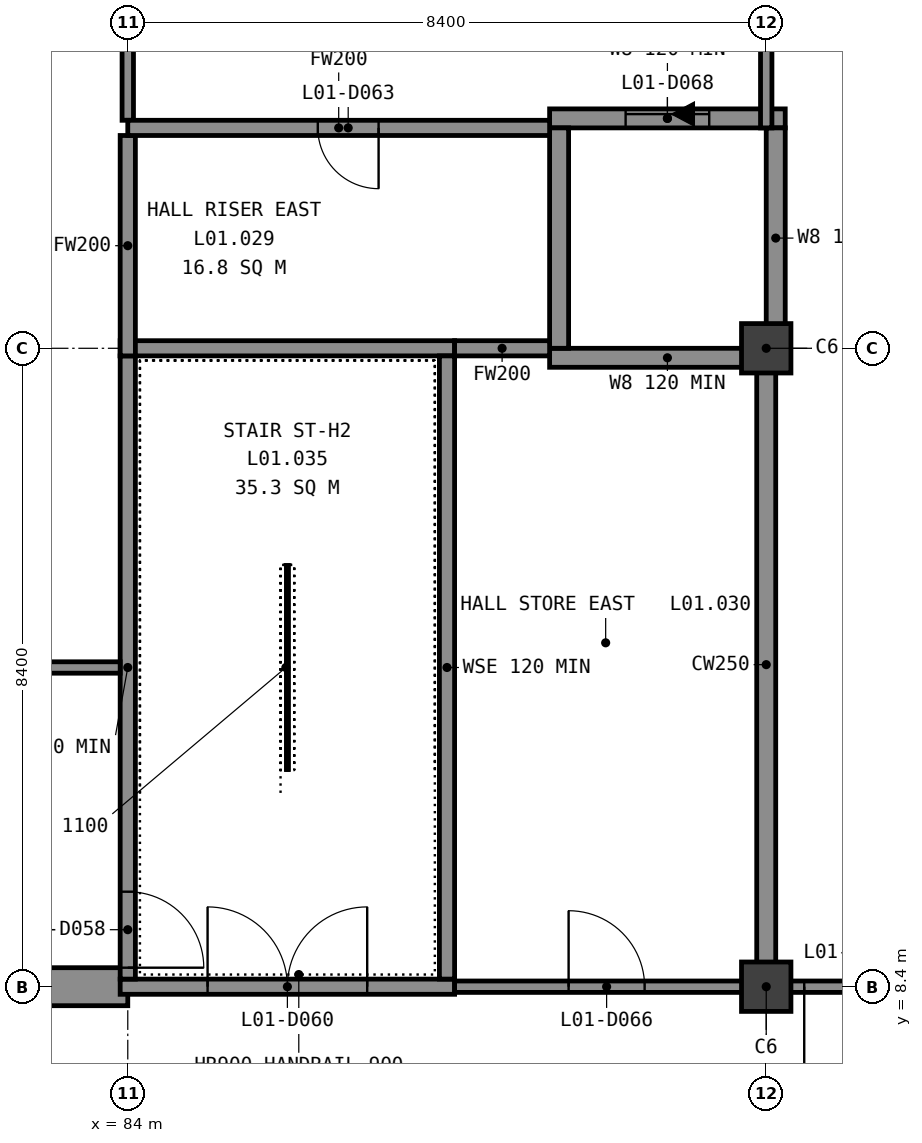
"""IFC4 building model, lengths in metres.
Left out: names, types, materials, properties, quantities, classifications, styles, units other than length and angle.
Written with IfcOpenShell. Run it as: python <this file> out.ifc"""

import sys

from ifc_helpers import new_model, si_unit, direction, frame, frame_2d, origin, origin_2d, place, context, subcontext, project, spatial, rectangle, extrude, element, fill, save


model = new_model("IFC4")
c1 = context("Model", 3, precision=1e-05, world=origin(), true_north=direction((0.0, 1.0)))
c2 = subcontext(c1, "Body", "Model", "MODEL_VIEW")
j1 = project(units=[si_unit("LENGTHUNIT", "METRE"), si_unit("PLANEANGLEUNIT", "RADIAN")], contexts=[c1])
p1 = place(None, origin())
s1 = spatial("IfcSite", under=j1, at=p1, CompositionType="ELEMENT")
p2 = place(p1, origin())
s2 = spatial("IfcBuilding", under=s1, at=p2, CompositionType="ELEMENT")
p3 = place(p2, frame((0.0, 0.0, 5.4)))
s3 = spatial("IfcBuildingStorey", under=s2, at=p3, CompositionType="ELEMENT", Elevation=5.4)
for number, where, z_axis, x_axis in (
    (1, (92.4, 8.4, -0.3), (0.0, 0.0, 1.0), (1.0, 0.0, 0.0)),
    (2, (92.4, 16.8, -0.3), (0.0, 0.0, 1.0), (1.0, 0.0, 0.0)),
):
    element("IfcColumn", number, at=place(p3, frame(where, z_axis=z_axis, x_axis=x_axis)), inside=s3, PredefinedType="COLUMN", context=c2, shape_type="SweptSolid", body=[
        extrude(rectangle(XDim=0.65, YDim=0.65, at=origin_2d()), origin(), (0.0, 0.0, 1.0), 4.55),
    ])
p4 = place(p3, frame((89.55, 16.675, -0.3), z_axis=(0.0, 0.0, 1.0), x_axis=(1.0, 0.0, 0.0)))
e3 = element("IfcWall", 3, at=p4, inside=s3, PredefinedType="SHEAR", context=c2, shape_type="SweptSolid", body=[
    extrude(rectangle(XDim=3.1, YDim=0.25, at=frame_2d((1.55, 0.0))), origin(), (0.0, 0.0, 1.0), 4.55),
])
p5 = place(p3, frame((89.55, 19.825, -0.3), z_axis=(0.0, 0.0, 1.0), x_axis=(1.0, 0.0, 0.0)))
e4 = element("IfcWall", 4, at=p5, inside=s3, PredefinedType="SHEAR", context=c2, shape_type="SweptSolid", body=[
    extrude(rectangle(XDim=3.1, YDim=0.25, at=frame_2d((1.55, 0.0))), origin(), (0.0, 0.0, 1.0), 4.55),
])
p6 = place(p5, frame((1.0, 0.0, 0.3)))
e5 = element("IfcOpeningElement", 5, at=p6, cuts=e4, PredefinedType="OPENING", context=c2, shape_type="SweptSolid", body=[
    extrude(rectangle(XDim=1.1, YDim=2.1, at=frame_2d((0.55, 1.05))), frame((0.0, 0.135, 0.0), z_axis=(0.0, -1.0, 0.0), x_axis=(1.0, 0.0, 0.0)), (0.0, 0.0, 1.0), 0.27),
])
for number, where, z_axis, x_axis in (
    (6, (89.675, 16.8, -0.3), (0.0, 0.0, 1.0), (0.0, 1.0, 0.0)),
    (7, (92.525, 16.8, -0.3), (0.0, 0.0, 1.0), (0.0, 1.0, 0.0)),
):
    element("IfcWall", number, at=place(p3, frame(where, z_axis=z_axis, x_axis=x_axis)), inside=s3, PredefinedType="SHEAR", context=c2, shape_type="SweptSolid", body=[
        extrude(rectangle(XDim=2.9, YDim=0.25, at=frame_2d((1.45, 0.0))), origin(), (0.0, 0.0, 1.0), 4.55),
    ])
p7 = place(p3, frame((42.0, 8.4, -0.3), z_axis=(0.0, 0.0, 1.0), x_axis=(1.0, 0.0, 0.0)))
e8 = element("IfcWall", 8, at=p7, inside=s3, PredefinedType="SHEAR", context=c2, shape_type="SweptSolid", body=[
    extrude(rectangle(XDim=42.0, YDim=0.5, at=frame_2d((21.0, 0.0))), origin(), (0.0, 0.0, 1.0), 4.55),
])
p8 = place(p7, frame((20.6, 0.0, 0.3)))
e9 = element("IfcOpeningElement", 9, at=p8, cuts=e8, PredefinedType="OPENING", context=c2, shape_type="SweptSolid", body=[
    extrude(rectangle(XDim=1.0, YDim=2.1, at=frame_2d((0.5, 1.05))), frame((0.0, 0.26, 0.0), z_axis=(0.0, -1.0, 0.0), x_axis=(1.0, 0.0, 0.0)), (0.0, 0.0, 1.0), 0.52),
])
p9 = place(p3, frame((83.9, 8.4, -0.3), z_axis=(0.0, 0.0, 1.0), x_axis=(1.0, 0.0, 0.0)))
e10 = element("IfcWall", 10, at=p9, inside=s3, PredefinedType="SHEAR", context=c2, shape_type="SweptSolid", body=[
    extrude(rectangle(XDim=4.4, YDim=0.2, at=frame_2d((2.2, 0.0))), origin(), (0.0, 0.0, 1.0), 4.5),
])
p10 = place(p9, frame((1.15, 0.0, 0.3)))
e11 = element("IfcOpeningElement", 11, at=p10, cuts=e10, PredefinedType="OPENING", context=c2, shape_type="SweptSolid", body=[
    extrude(rectangle(XDim=2.1, YDim=2.1, at=frame_2d((1.05, 1.05))), frame((0.0, 0.11, 0.0), z_axis=(0.0, -1.0, 0.0), x_axis=(1.0, 0.0, 0.0)), (0.0, 0.0, 1.0), 0.22),
])
p11 = place(p3, frame((83.9, 16.8, -0.3), z_axis=(0.0, 0.0, 1.0), x_axis=(1.0, 0.0, 0.0)))
e12 = element("IfcWall", 12, at=p11, inside=s3, PredefinedType="SHEAR", context=c2, shape_type="SweptSolid", body=[
    extrude(rectangle(XDim=4.4, YDim=0.2, at=frame_2d((2.2, 0.0))), origin(), (0.0, 0.0, 1.0), 4.5),
])
p12 = place(p3, frame((84.0, 8.5, -0.3), z_axis=(0.0, 0.0, 1.0), x_axis=(0.0, 1.0, 0.0)))
e13 = element("IfcWall", 13, at=p12, inside=s3, PredefinedType="SHEAR", context=c2, shape_type="SweptSolid", body=[
    extrude(rectangle(XDim=8.2, YDim=0.2, at=frame_2d((4.1, 0.0))), origin(), (0.0, 0.0, 1.0), 4.5),
])
p13 = place(p12, frame((0.15, 0.0, 0.3)))
e14 = element("IfcOpeningElement", 14, at=p13, cuts=e13, PredefinedType="OPENING", context=c2, shape_type="SweptSolid", body=[
    extrude(rectangle(XDim=1.0, YDim=2.1, at=frame_2d((0.5, 1.05))), frame((0.0, 0.11, 0.0), z_axis=(0.0, -1.0, 0.0), x_axis=(1.0, 0.0, 0.0)), (0.0, 0.0, 1.0), 0.22),
])
p14 = place(p3, frame((88.2, 8.5, -0.3), z_axis=(0.0, 0.0, 1.0), x_axis=(0.0, 1.0, 0.0)))
e15 = element("IfcWall", 15, at=p14, inside=s3, PredefinedType="SHEAR", context=c2, shape_type="SweptSolid", body=[
    extrude(rectangle(XDim=8.2, YDim=0.2, at=frame_2d((4.1, 0.0))), origin(), (0.0, 0.0, 1.0), 4.5),
])
p15 = place(p3, frame((41.875, 12.6, -0.3), z_axis=(0.0, 0.0, 1.0), x_axis=(1.0, 0.0, 0.0)))
e16 = element("IfcWall", 16, at=p15, inside=s3, PredefinedType="PARTITIONING", context=c2, shape_type="SweptSolid", body=[
    extrude(rectangle(XDim=42.025, YDim=0.15, at=frame_2d((21.012, 0.0))), origin(), (0.0, 0.0, 1.0), 4.5),
])
p16 = place(p3, frame((84.0, 16.7, -0.3), z_axis=(0.0, 0.0, 1.0), x_axis=(0.0, 1.0, 0.0)))
e17 = element("IfcWall", 17, at=p16, inside=s3, PredefinedType="SOLIDWALL", context=c2, shape_type="SweptSolid", body=[
    extrude(rectangle(XDim=2.9, YDim=0.2, at=frame_2d((1.45, 0.0))), origin(), (0.0, 0.0, 1.0), 4.5),
])
p17 = place(p3, frame((84.0, 19.8, -0.3), z_axis=(0.0, 0.0, 1.0), x_axis=(0.0, 1.0, 0.0)))
e18 = element("IfcWall", 18, at=p17, inside=s3, PredefinedType="PARTITIONING", context=c2, shape_type="SweptSolid", body=[
    extrude(rectangle(XDim=5.805, YDim=0.15, at=frame_2d((2.902, 0.0))), origin(), (0.0, 0.0, 1.0), 4.5),
])
p18 = place(p3, frame((88.3, 8.4, 0.0), z_axis=(0.0, 0.0, 1.0), x_axis=(1.0, 0.0, 0.0)))
e19 = element("IfcWall", 19, at=p18, inside=s3, PredefinedType="PARTITIONING", context=c2, shape_type="SweptSolid", body=[
    extrude(rectangle(XDim=4.405, YDim=0.15, at=frame_2d((2.203, 0.0))), origin(), (0.0, 0.0, 1.0), 4.2),
])
p19 = place(p18, frame((1.5, 0.0, 0.0)))
e20 = element("IfcOpeningElement", 20, at=p19, cuts=e19, PredefinedType="OPENING", context=c2, shape_type="SweptSolid", body=[
    extrude(rectangle(XDim=1.0, YDim=2.1, at=frame_2d((0.5, 1.05))), frame((0.0, 0.085, 0.0), z_axis=(0.0, -1.0, 0.0), x_axis=(1.0, 0.0, 0.0)), (0.0, 0.0, 1.0), 0.17),
])
p20 = place(p3, frame((92.705, 8.4, 0.0), z_axis=(0.0, 0.0, 1.0), x_axis=(1.0, 0.0, 0.0)))
e21 = element("IfcWall", 21, at=p20, inside=s3, PredefinedType="PARTITIONING", context=c2, shape_type="SweptSolid", body=[
    extrude(rectangle(XDim=75.295, YDim=0.15, at=frame_2d((37.647, 0.0))), origin(), (0.0, 0.0, 1.0), 3.5),
])
p21 = place(p20, frame((0.195, 0.0, 0.0)))
e22 = element("IfcOpeningElement", 22, at=p21, cuts=e21, PredefinedType="OPENING", context=c2, shape_type="SweptSolid", body=[
    extrude(rectangle(XDim=1.2, YDim=2.1, at=frame_2d((0.6, 1.05))), frame((0.0, 0.085, 0.0), z_axis=(0.0, -1.0, 0.0), x_axis=(1.0, 0.0, 0.0)), (0.0, 0.0, 1.0), 0.17),
])
p22 = place(p20, frame((23.195, 0.0, 0.0)))
e23 = element("IfcOpeningElement", 23, at=p22, cuts=e21, PredefinedType="OPENING", context=c2, shape_type="SweptSolid", body=[
    extrude(rectangle(XDim=1.2, YDim=2.1, at=frame_2d((0.6, 1.05))), frame((0.0, 0.085, 0.0), z_axis=(0.0, -1.0, 0.0), x_axis=(1.0, 0.0, 0.0)), (0.0, 0.0, 1.0), 0.17),
])
p23 = place(p20, frame((25.395, 0.0, 0.0)))
e24 = element("IfcOpeningElement", 24, at=p23, cuts=e21, PredefinedType="OPENING", context=c2, shape_type="SweptSolid", body=[
    extrude(rectangle(XDim=1.2, YDim=2.1, at=frame_2d((0.6, 1.05))), frame((0.0, 0.085, 0.0), z_axis=(0.0, -1.0, 0.0), x_axis=(1.0, 0.0, 0.0)), (0.0, 0.0, 1.0), 0.17),
])
p24 = place(p20, frame((39.995, 0.0, 0.0)))
e25 = element("IfcOpeningElement", 25, at=p24, cuts=e21, PredefinedType="OPENING", context=c2, shape_type="SweptSolid", body=[
    extrude(rectangle(XDim=1.2, YDim=2.1, at=frame_2d((0.6, 1.05))), frame((0.0, 0.085, 0.0), z_axis=(0.0, -1.0, 0.0), x_axis=(1.0, 0.0, 0.0)), (0.0, 0.0, 1.0), 0.17),
])
p25 = place(p20, frame((42.195, 0.0, 0.0)))
e26 = element("IfcOpeningElement", 26, at=p25, cuts=e21, PredefinedType="OPENING", context=c2, shape_type="SweptSolid", body=[
    extrude(rectangle(XDim=1.2, YDim=2.1, at=frame_2d((0.6, 1.05))), frame((0.0, 0.085, 0.0), z_axis=(0.0, -1.0, 0.0), x_axis=(1.0, 0.0, 0.0)), (0.0, 0.0, 1.0), 0.17),
])
p26 = place(p20, frame((56.795, 0.0, 0.0)))
e27 = element("IfcOpeningElement", 27, at=p26, cuts=e21, PredefinedType="OPENING", context=c2, shape_type="SweptSolid", body=[
    extrude(rectangle(XDim=1.2, YDim=2.1, at=frame_2d((0.6, 1.05))), frame((0.0, 0.085, 0.0), z_axis=(0.0, -1.0, 0.0), x_axis=(1.0, 0.0, 0.0)), (0.0, 0.0, 1.0), 0.17),
])
p27 = place(p20, frame((67.395, 0.0, 0.0)))
e28 = element("IfcOpeningElement", 28, at=p27, cuts=e21, PredefinedType="OPENING", context=c2, shape_type="SweptSolid", body=[
    extrude(rectangle(XDim=1.2, YDim=2.1, at=frame_2d((0.6, 1.05))), frame((0.0, 0.085, 0.0), z_axis=(0.0, -1.0, 0.0), x_axis=(1.0, 0.0, 0.0)), (0.0, 0.0, 1.0), 0.17),
])
p28 = place(p3, frame((88.3, 16.8, 0.0), z_axis=(0.0, 0.0, 1.0), x_axis=(1.0, 0.0, 0.0)))
e29 = element("IfcWall", 29, at=p28, inside=s3, PredefinedType="SOLIDWALL", context=c2, shape_type="SweptSolid", body=[
    extrude(rectangle(XDim=1.25, YDim=0.2, at=frame_2d((0.625, 0.0))), origin(), (0.0, 0.0, 1.0), 4.2),
])
p29 = place(p3, frame((84.0, 19.7, 0.0), z_axis=(0.0, 0.0, 1.0), x_axis=(1.0, 0.0, 0.0)))
e30 = element("IfcWall", 30, at=p29, inside=s3, PredefinedType="SOLIDWALL", context=c2, shape_type="SweptSolid", body=[
    extrude(rectangle(XDim=5.55, YDim=0.2, at=frame_2d((2.775, 0.0))), origin(), (0.0, 0.0, 1.0), 4.2),
])
p30 = place(p29, frame((2.5, 0.0, 0.0)))
e31 = element("IfcOpeningElement", 31, at=p30, cuts=e30, PredefinedType="OPENING", context=c2, shape_type="SweptSolid", body=[
    extrude(rectangle(XDim=0.8, YDim=2.1, at=frame_2d((0.4, 1.05))), frame((0.0, 0.11, 0.0), z_axis=(0.0, -1.0, 0.0), x_axis=(1.0, 0.0, 0.0)), (0.0, 0.0, 1.0), 0.22),
])
p31 = place(p3, frame((92.4, 8.475, 0.0), z_axis=(0.0, 0.0, 1.0), x_axis=(0.0, 1.0, 0.0)))
e32 = element("IfcWall", 32, at=p31, inside=s3, PredefinedType="SOLIDWALL", context=c2, shape_type="SweptSolid", body=[
    extrude(rectangle(XDim=8.325, YDim=0.25, at=frame_2d((4.163, 0.0))), origin(), (0.0, 0.0, 1.0), 3.5),
])
p32 = place(p3, frame((92.4, 19.7, 0.0), z_axis=(0.0, 0.0, 1.0), x_axis=(0.0, 1.0, 0.0)))
e33 = element("IfcWall", 33, at=p32, inside=s3, PredefinedType="PARTITIONING", context=c2, shape_type="SweptSolid", body=[
    extrude(rectangle(XDim=13.595, YDim=0.15, at=frame_2d((6.797, 0.0))), origin(), (0.0, 0.0, 1.0), 3.5),
])
p33 = place(p32, frame((6.0, 0.0, 0.0)))
e34 = element("IfcOpeningElement", 34, at=p33, cuts=e33, PredefinedType="OPENING", context=c2, shape_type="SweptSolid", body=[
    extrude(rectangle(XDim=2.1, YDim=2.25, at=frame_2d((1.05, 1.125))), frame((0.0, 0.085, 0.0), z_axis=(0.0, -1.0, 0.0), x_axis=(1.0, 0.0, 0.0)), (0.0, 0.0, 1.0), 0.17),
])
p34 = place(p32, frame((11.3, 0.0, 0.0)))
e35 = element("IfcOpeningElement", 35, at=p34, cuts=e33, PredefinedType="OPENING", context=c2, shape_type="SweptSolid", body=[
    extrude(rectangle(XDim=2.1, YDim=2.25, at=frame_2d((1.05, 1.125))), frame((0.0, 0.085, 0.0), z_axis=(0.0, -1.0, 0.0), x_axis=(1.0, 0.0, 0.0)), (0.0, 0.0, 1.0), 0.17),
])
p35 = place(p6, origin())
e36 = element("IfcDoor", 36, at=p35, inside=s3, OperationType="SLIDING_TO_LEFT", PredefinedType="DOOR", context=c2, shape_type="SweptSolid", body=[
    extrude(rectangle(XDim=1.1, YDim=2.1, at=frame_2d((0.55, 1.05))), frame((0.0, 0.025, 0.0), z_axis=(0.0, -1.0, 0.0), x_axis=(1.0, 0.0, 0.0)), (0.0, 0.0, 1.0), 0.05),
])
fill(e5, e36)
p36 = place(p10, origin())
e37 = element("IfcDoor", 37, at=p36, inside=s3, OperationType="DOUBLE_DOOR_SINGLE_SWING", PredefinedType="DOOR", context=c2, shape_type="SweptSolid", body=[
    extrude(rectangle(XDim=2.1, YDim=2.1, at=frame_2d((1.05, 1.05))), frame((0.0, 0.025, 0.0), z_axis=(0.0, -1.0, 0.0), x_axis=(1.0, 0.0, 0.0)), (0.0, 0.0, 1.0), 0.05),
])
fill(e11, e37)
p37 = place(p13, origin())
e38 = element("IfcDoor", 38, at=p37, inside=s3, OperationType="SINGLE_SWING_LEFT", PredefinedType="DOOR", context=c2, shape_type="SweptSolid", body=[
    extrude(rectangle(XDim=1.0, YDim=2.1, at=frame_2d((0.5, 1.05))), frame((0.0, 0.025, 0.0), z_axis=(0.0, -1.0, 0.0), x_axis=(1.0, 0.0, 0.0)), (0.0, 0.0, 1.0), 0.05),
])
fill(e14, e38)
p38 = place(p30, origin())
e39 = element("IfcDoor", 39, at=p38, inside=s3, OperationType="SINGLE_SWING_RIGHT", PredefinedType="DOOR", context=c2, shape_type="SweptSolid", body=[
    extrude(rectangle(XDim=0.8, YDim=2.1, at=frame_2d((0.4, 1.05))), frame((0.0, 0.025, 0.0), z_axis=(0.0, -1.0, 0.0), x_axis=(1.0, 0.0, 0.0)), (0.0, 0.0, 1.0), 0.05),
])
fill(e31, e39)
p39 = place(p19, origin())
e40 = element("IfcDoor", 40, at=p39, inside=s3, OperationType="SINGLE_SWING_RIGHT", PredefinedType="DOOR", context=c2, shape_type="SweptSolid", body=[
    extrude(rectangle(XDim=1.0, YDim=2.1, at=frame_2d((0.5, 1.05))), frame((0.0, 0.025, 0.0), z_axis=(0.0, -1.0, 0.0), x_axis=(1.0, 0.0, 0.0)), (0.0, 0.0, 1.0), 0.05),
])
fill(e20, e40)
p40 = place(p21, origin())
e41 = element("IfcDoor", 41, at=p40, inside=s3, OperationType="SINGLE_SWING_LEFT", PredefinedType="DOOR", context=c2, shape_type="SweptSolid", body=[
    extrude(rectangle(XDim=1.2, YDim=2.1, at=frame_2d((0.6, 1.05))), frame((0.0, 0.025, 0.0), z_axis=(0.0, -1.0, 0.0), x_axis=(1.0, 0.0, 0.0)), (0.0, 0.0, 1.0), 0.05),
])
fill(e22, e41)
save(model, sys.argv[1])
